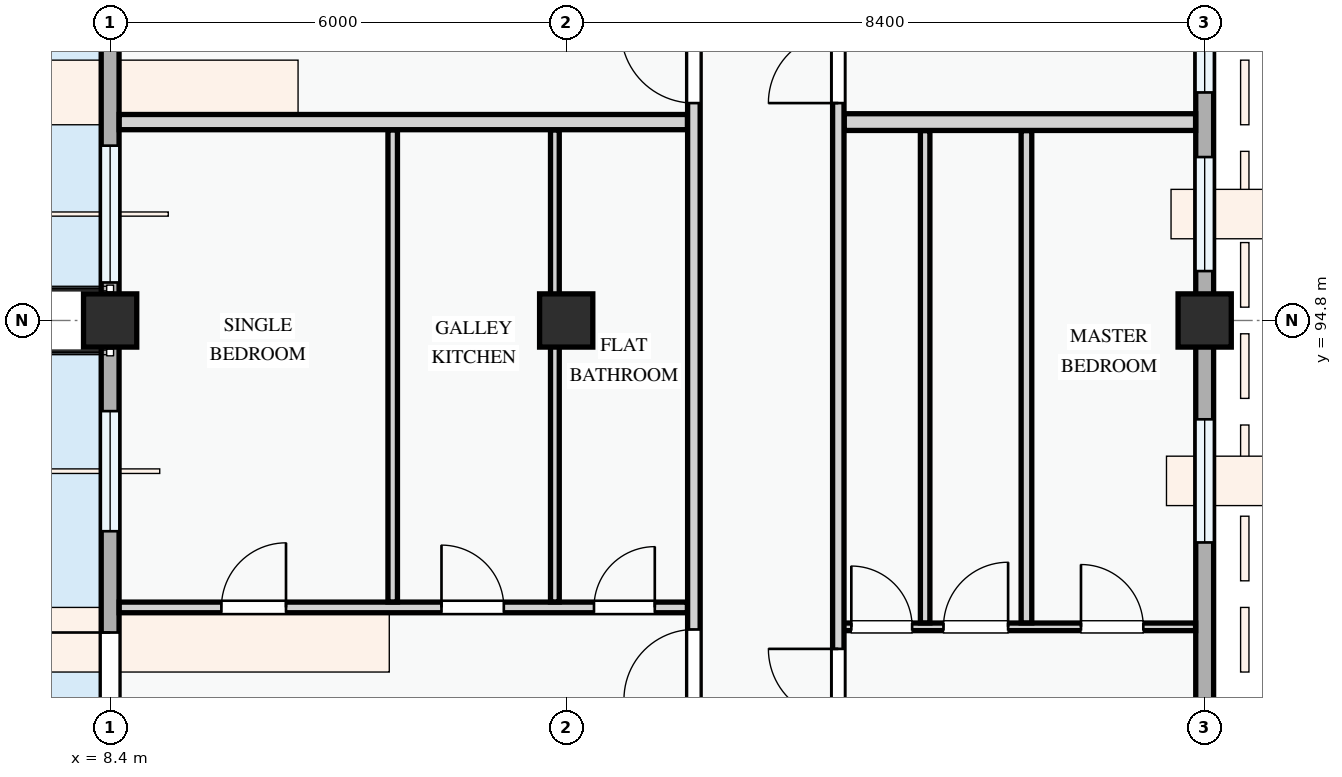
"""IFC4 building model, lengths in metres.
Left out: names, types, materials, properties, quantities, classifications, styles, units other than length and angle.
Written with IfcOpenShell. Run it as: python <this file> out.ifc"""

import sys

from ifc_helpers import new_model, si_unit, direction, frame, frame_2d, origin, origin_2d, place, context, subcontext, project, spatial, rectangle, extrude, element, fill, save


model = new_model("IFC4")
c1 = context("Model", 3, precision=1e-05, world=origin(), true_north=direction((0.0, 1.0)))
c2 = subcontext(c1, "Body", "Model", "MODEL_VIEW")
j1 = project(units=[si_unit("LENGTHUNIT", "METRE"), si_unit("PLANEANGLEUNIT", "RADIAN")], contexts=[c1])
p1 = place(None, origin())
s1 = spatial("IfcSite", under=j1, at=p1, CompositionType="ELEMENT")
p2 = place(p1, origin())
s2 = spatial("IfcBuilding", under=s1, at=p2, CompositionType="ELEMENT")
p3 = place(p2, frame((0.0, 0.0, 11.4)))
s3 = spatial("IfcBuildingStorey", under=s2, at=p3, CompositionType="ELEMENT", Elevation=11.4)
for number, where, z_axis, x_axis in (
    (1, (8.4, 94.8, 0.0), (0.0, 0.0, 1.0), (1.0, 0.0, 0.0)),
    (2, (14.4, 94.8, 0.0), (0.0, 0.0, 1.0), (1.0, 0.0, 0.0)),
    (3, (22.8, 94.8, 0.0), (0.0, 0.0, 1.0), (1.0, 0.0, 0.0)),
):
    element("IfcColumn", number, at=place(p3, frame(where, z_axis=z_axis, x_axis=x_axis)), inside=s3, PredefinedType="COLUMN", context=c2, shape_type="SweptSolid", body=[
        extrude(rectangle(XDim=0.7, YDim=0.7, at=origin_2d()), origin(), (0.0, 0.0, 1.0), 3.3),
    ])
p4 = place(p3, frame((8.4, 100.8, 0.0), z_axis=(0.0, 0.0, 1.0), x_axis=(0.0, -1.0, 0.0)))
e4 = element("IfcWall", 4, at=p4, inside=s3, PredefinedType="STANDARD", context=c2, shape_type="SweptSolid", body=[
    extrude(rectangle(XDim=6.0, YDim=0.235, at=frame_2d((3.0, 0.0))), origin(), (0.0, 0.0, 1.0), 2.575),
])
p5 = place(p4, frame((1.24, 0.0, 0.0)))
e5 = element("IfcOpeningElement", 5, at=p5, cuts=e4, PredefinedType="OPENING", context=c2, shape_type="SweptSolid", body=[
    extrude(rectangle(XDim=1.2, YDim=2.15, at=frame_2d((0.6, 1.075))), frame((0.0, 0.127, 0.0), z_axis=(0.0, -1.0, 0.0), x_axis=(1.0, 0.0, 0.0)), (0.0, 0.0, 1.0), 0.255),
])
p6 = place(p4, frame((3.7, 0.0, 0.78)))
e6 = element("IfcOpeningElement", 6, at=p6, cuts=e4, PredefinedType="OPENING", context=c2, shape_type="SweptSolid", body=[
    extrude(rectangle(XDim=1.8, YDim=1.5, at=frame_2d((0.9, 0.75))), frame((0.0, 0.127, 0.0), z_axis=(0.0, -1.0, 0.0), x_axis=(1.0, 0.0, 0.0)), (0.0, 0.0, 1.0), 0.255),
])
p7 = place(p3, frame((8.4, 94.8, 0.0), z_axis=(0.0, 0.0, 1.0), x_axis=(0.0, -1.0, 0.0)))
e7 = element("IfcWall", 7, at=p7, inside=s3, PredefinedType="STANDARD", context=c2, shape_type="SweptSolid", body=[
    extrude(rectangle(XDim=8.4, YDim=0.235, at=frame_2d((4.2, 0.0))), origin(), (0.0, 0.0, 1.0), 2.425),
])
p8 = place(p7, frame((4.105, 0.0, 0.0)))
e8 = element("IfcOpeningElement", 8, at=p8, cuts=e7, PredefinedType="OPENING", context=c2, shape_type="SweptSolid", body=[
    extrude(rectangle(XDim=1.25, YDim=2.2, at=frame_2d((0.625, 1.1))), frame((0.0, 0.127, 0.0), z_axis=(0.0, -1.0, 0.0), x_axis=(1.0, 0.0, 0.0)), (0.0, 0.0, 1.0), 0.255),
])
p9 = place(p7, frame((1.192, 0.0, 0.78)))
e9 = element("IfcOpeningElement", 9, at=p9, cuts=e7, PredefinedType="OPENING", context=c2, shape_type="SweptSolid", body=[
    extrude(rectangle(XDim=1.58, YDim=1.48, at=frame_2d((0.79, 0.74))), frame((0.0, 0.127, 0.0), z_axis=(0.0, -1.0, 0.0), x_axis=(1.0, 0.0, 0.0)), (0.0, 0.0, 1.0), 0.255),
])
p10 = place(p7, frame((5.768, 0.0, 0.78)))
e10 = element("IfcOpeningElement", 10, at=p10, cuts=e7, PredefinedType="OPENING", context=c2, shape_type="SweptSolid", body=[
    extrude(rectangle(XDim=2.08, YDim=1.52, at=frame_2d((1.04, 0.76))), frame((0.0, 0.127, 0.0), z_axis=(0.0, -1.0, 0.0), x_axis=(1.0, 0.0, 0.0)), (0.0, 0.0, 1.0), 0.255),
])
p11 = place(p3, frame((22.8, 86.4, 0.0), z_axis=(0.0, 0.0, 1.0), x_axis=(0.0, 1.0, 0.0)))
e11 = element("IfcWall", 11, at=p11, inside=s3, PredefinedType="STANDARD", context=c2, shape_type="SweptSolid", body=[
    extrude(rectangle(XDim=8.4, YDim=0.235, at=frame_2d((4.2, 0.0))), origin(), (0.0, 0.0, 1.0), 2.425),
])
p12 = place(p11, frame((1.59, 0.0, 0.78)))
e12 = element("IfcOpeningElement", 12, at=p12, cuts=e11, PredefinedType="OPENING", context=c2, shape_type="SweptSolid", body=[
    extrude(rectangle(XDim=1.38, YDim=1.48, at=frame_2d((0.69, 0.74))), frame((0.0, 0.127, 0.0), z_axis=(0.0, -1.0, 0.0), x_axis=(1.0, 0.0, 0.0)), (0.0, 0.0, 1.0), 0.255),
])
p13 = place(p11, frame((5.48, 0.0, 0.78)))
e13 = element("IfcOpeningElement", 13, at=p13, cuts=e11, PredefinedType="OPENING", context=c2, shape_type="SweptSolid", body=[
    extrude(rectangle(XDim=1.62, YDim=1.38, at=frame_2d((0.81, 0.69))), frame((0.0, 0.127, 0.0), z_axis=(0.0, -1.0, 0.0), x_axis=(1.0, 0.0, 0.0)), (0.0, 0.0, 1.0), 0.255),
])
p14 = place(p3, frame((22.8, 94.8, 0.0), z_axis=(0.0, 0.0, 1.0), x_axis=(0.0, 1.0, 0.0)))
e14 = element("IfcWall", 14, at=p14, inside=s3, PredefinedType="STANDARD", context=c2, shape_type="SweptSolid", body=[
    extrude(rectangle(XDim=6.0, YDim=0.235, at=frame_2d((3.0, 0.0))), origin(), (0.0, 0.0, 1.0), 2.575),
])
p15 = place(p14, frame((0.65, 0.0, 0.78)))
e15 = element("IfcOpeningElement", 15, at=p15, cuts=e14, PredefinedType="OPENING", context=c2, shape_type="SweptSolid", body=[
    extrude(rectangle(XDim=1.5, YDim=1.5, at=frame_2d((0.75, 0.75))), frame((0.0, 0.127, 0.0), z_axis=(0.0, -1.0, 0.0), x_axis=(1.0, 0.0, 0.0)), (0.0, 0.0, 1.0), 0.255),
])
p16 = place(p14, frame((3.0, 0.0, 0.78)))
e16 = element("IfcOpeningElement", 16, at=p16, cuts=e14, PredefinedType="OPENING", context=c2, shape_type="SweptSolid", body=[
    extrude(rectangle(XDim=2.42, YDim=1.52, at=frame_2d((1.21, 0.76))), frame((0.0, 0.127, 0.0), z_axis=(0.0, -1.0, 0.0), x_axis=(1.0, 0.0, 0.0)), (0.0, 0.0, 1.0), 0.255),
])
p17 = place(p3, frame((8.52, 91.025, 0.0), z_axis=(0.0, 0.0, 1.0), x_axis=(1.0, 0.0, 0.0)))
e17 = element("IfcWall", 17, at=p17, inside=s3, PredefinedType="PARTITIONING", context=c2, shape_type="SweptSolid", body=[
    extrude(rectangle(XDim=7.476, YDim=0.14, at=frame_2d((3.738, 0.0))), origin(), (0.0, 0.0, 1.0), 3.0),
])
p18 = place(p17, frame((1.344, 0.0, 0.0)))
e18 = element("IfcOpeningElement", 18, at=p18, cuts=e17, PredefinedType="OPENING", context=c2, shape_type="SweptSolid", body=[
    extrude(rectangle(XDim=0.85, YDim=2.1, at=frame_2d((0.425, 1.05))), frame((0.0, 0.08, 0.0), z_axis=(0.0, -1.0, 0.0), x_axis=(1.0, 0.0, 0.0)), (0.0, 0.0, 1.0), 0.16),
])
p19 = place(p17, frame((4.24, 0.0, 0.0)))
e19 = element("IfcOpeningElement", 19, at=p19, cuts=e17, PredefinedType="OPENING", context=c2, shape_type="SweptSolid", body=[
    extrude(rectangle(XDim=0.82, YDim=2.08, at=frame_2d((0.41, 1.04))), frame((0.0, 0.08, 0.0), z_axis=(0.0, -1.0, 0.0), x_axis=(1.0, 0.0, 0.0)), (0.0, 0.0, 1.0), 0.16),
])
p20 = place(p17, frame((6.246, 0.0, 0.0)))
e20 = element("IfcOpeningElement", 20, at=p20, cuts=e17, PredefinedType="OPENING", context=c2, shape_type="SweptSolid", body=[
    extrude(rectangle(XDim=0.8, YDim=2.1, at=frame_2d((0.4, 1.05))), frame((0.0, 0.08, 0.0), z_axis=(0.0, -1.0, 0.0), x_axis=(1.0, 0.0, 0.0)), (0.0, 0.0, 1.0), 0.16),
])
p21 = place(p3, frame((12.118, 91.097, 0.0), z_axis=(0.0, 0.0, 1.0), x_axis=(0.0, 1.0, 0.0)))
e21 = element("IfcWall", 21, at=p21, inside=s3, PredefinedType="PARTITIONING", context=c2, shape_type="SweptSolid", body=[
    extrude(rectangle(XDim=6.211, YDim=0.125, at=frame_2d((3.105, 0.0))), origin(), (0.0, 0.0, 1.0), 3.0),
])
p22 = place(p3, frame((14.251, 91.097, 0.0), z_axis=(0.0, 0.0, 1.0), x_axis=(0.0, 1.0, 0.0)))
e22 = element("IfcWall", 22, at=p22, inside=s3, PredefinedType="PARTITIONING", context=c2, shape_type="SweptSolid", body=[
    extrude(rectangle(XDim=6.211, YDim=0.115, at=frame_2d((3.105, 0.0))), origin(), (0.0, 0.0, 1.0), 2.425),
])
p23 = place(p3, frame((17.98, 90.77, 0.0), z_axis=(0.0, 0.0, 1.0), x_axis=(1.0, 0.0, 0.0)))
e23 = element("IfcWall", 23, at=p23, inside=s3, PredefinedType="PARTITIONING", context=c2, shape_type="SweptSolid", body=[
    extrude(rectangle(XDim=4.7, YDim=0.1, at=frame_2d((2.35, 0.0))), origin(), (0.0, 0.0, 1.0), 3.0),
])
p24 = place(p23, frame((0.171, 0.0, 0.0)))
e24 = element("IfcOpeningElement", 24, at=p24, cuts=e23, PredefinedType="OPENING", context=c2, shape_type="SweptSolid", body=[
    extrude(rectangle(XDim=0.8, YDim=2.1, at=frame_2d((0.4, 1.05))), frame((0.0, 0.06, 0.0), z_axis=(0.0, -1.0, 0.0), x_axis=(1.0, 0.0, 0.0)), (0.0, 0.0, 1.0), 0.12),
])
p25 = place(p23, frame((1.384, 0.0, 0.0)))
e25 = element("IfcOpeningElement", 25, at=p25, cuts=e23, PredefinedType="OPENING", context=c2, shape_type="SweptSolid", body=[
    extrude(rectangle(XDim=0.85, YDim=2.1, at=frame_2d((0.425, 1.05))), frame((0.0, 0.06, 0.0), z_axis=(0.0, -1.0, 0.0), x_axis=(1.0, 0.0, 0.0)), (0.0, 0.0, 1.0), 0.12),
])
p26 = place(p23, frame((3.193, 0.0, 0.0)))
e26 = element("IfcOpeningElement", 26, at=p26, cuts=e23, PredefinedType="OPENING", context=c2, shape_type="SweptSolid", body=[
    extrude(rectangle(XDim=0.82, YDim=2.08, at=frame_2d((0.41, 1.04))), frame((0.0, 0.06, 0.0), z_axis=(0.0, -1.0, 0.0), x_axis=(1.0, 0.0, 0.0)), (0.0, 0.0, 1.0), 0.12),
])
p27 = place(p3, frame((20.455, 90.822, 0.0), z_axis=(0.0, 0.0, 1.0), x_axis=(0.0, 1.0, 0.0)))
e27 = element("IfcWall", 27, at=p27, inside=s3, PredefinedType="PARTITIONING", context=c2, shape_type="SweptSolid", body=[
    extrude(rectangle(XDim=6.477, YDim=0.14, at=frame_2d((3.238, 0.0))), origin(), (0.0, 0.0, 1.0), 3.0),
])
p28 = place(p3, frame((19.122, 90.822, 0.0), z_axis=(0.0, 0.0, 1.0), x_axis=(0.0, 1.0, 0.0)))
e28 = element("IfcWall", 28, at=p28, inside=s3, PredefinedType="PARTITIONING", context=c2, shape_type="SweptSolid", body=[
    extrude(rectangle(XDim=6.477, YDim=0.125, at=frame_2d((3.238, 0.0))), origin(), (0.0, 0.0, 1.0), 3.0),
])
p29 = place(p3, frame((8.52, 97.41, 0.0), z_axis=(0.0, 0.0, 1.0), x_axis=(1.0, 0.0, 0.0)))
e29 = element("IfcWall", 29, at=p29, inside=s3, PredefinedType="PARTITIONING", context=c2, shape_type="SweptSolid", body=[
    extrude(rectangle(XDim=7.476, YDim=0.2, at=frame_2d((3.738, 0.0))), origin(), (0.0, 0.0, 1.0), 3.0),
])
p30 = place(p3, frame((18.057, 97.41, 0.0), z_axis=(0.0, 0.0, 1.0), x_axis=(1.0, 0.0, 0.0)))
e30 = element("IfcWall", 30, at=p30, inside=s3, PredefinedType="PARTITIONING", context=c2, shape_type="SweptSolid", body=[
    extrude(rectangle(XDim=4.624, YDim=0.22, at=frame_2d((2.312, 0.0))), origin(), (0.0, 0.0, 1.0), 3.0),
])
p31 = place(p3, frame((16.08, 72.06, 0.0), z_axis=(0.0, 0.0, 1.0), x_axis=(0.0, 1.0, 0.0)))
e31 = element("IfcWall", 31, at=p31, inside=s3, PredefinedType="PARTITIONING", context=c2, shape_type="SweptSolid", body=[
    extrude(rectangle(XDim=37.28, YDim=0.165, at=frame_2d((18.64, 0.0))), origin(), (0.0, 0.0, 1.0), 3.0),
])
p32 = place(p31, frame((3.722, 0.0, 0.0)))
e32 = element("IfcOpeningElement", 32, at=p32, cuts=e31, PredefinedType="OPENING", context=c2, shape_type="SweptSolid", body=[
    extrude(rectangle(XDim=0.92, YDim=2.1, at=frame_2d((0.46, 1.05))), frame((0.0, 0.093, 0.0), z_axis=(0.0, -1.0, 0.0), x_axis=(1.0, 0.0, 0.0)), (0.0, 0.0, 1.0), 0.185),
])
p33 = place(p31, frame((17.755, 0.0, 0.0)))
e33 = element("IfcOpeningElement", 33, at=p33, cuts=e31, PredefinedType="OPENING", context=c2, shape_type="SweptSolid", body=[
    extrude(rectangle(XDim=0.92, YDim=2.1, at=frame_2d((0.46, 1.05))), frame((0.0, 0.093, 0.0), z_axis=(0.0, -1.0, 0.0), x_axis=(1.0, 0.0, 0.0)), (0.0, 0.0, 1.0), 0.185),
])
p34 = place(p31, frame((25.6, 0.0, 0.0)))
e34 = element("IfcOpeningElement", 34, at=p34, cuts=e31, PredefinedType="OPENING", context=c2, shape_type="SweptSolid", body=[
    extrude(rectangle(XDim=0.96, YDim=2.12, at=frame_2d((0.48, 1.06))), frame((0.0, 0.093, 0.0), z_axis=(0.0, -1.0, 0.0), x_axis=(1.0, 0.0, 0.0)), (0.0, 0.0, 1.0), 0.185),
])
p35 = place(p3, frame((17.98, 72.06, 0.0), z_axis=(0.0, 0.0, 1.0), x_axis=(0.0, 1.0, 0.0)))
e35 = element("IfcWall", 35, at=p35, inside=s3, PredefinedType="PARTITIONING", context=c2, shape_type="SweptSolid", body=[
    extrude(rectangle(XDim=37.28, YDim=0.15, at=frame_2d((18.64, 0.0))), origin(), (0.0, 0.0, 1.0), 3.0),
])
p36 = place(p35, frame((3.684, 0.0, 0.0)))
e36 = element("IfcOpeningElement", 36, at=p36, cuts=e35, PredefinedType="OPENING", context=c2, shape_type="SweptSolid", body=[
    extrude(rectangle(XDim=0.92, YDim=2.1, at=frame_2d((0.46, 1.05))), frame((0.0, 0.085, 0.0), z_axis=(0.0, -1.0, 0.0), x_axis=(1.0, 0.0, 0.0)), (0.0, 0.0, 1.0), 0.17),
])
p37 = place(p35, frame((17.5, 0.0, 0.0)))
e37 = element("IfcOpeningElement", 37, at=p37, cuts=e35, PredefinedType="OPENING", context=c2, shape_type="SweptSolid", body=[
    extrude(rectangle(XDim=0.92, YDim=2.1, at=frame_2d((0.46, 1.05))), frame((0.0, 0.085, 0.0), z_axis=(0.0, -1.0, 0.0), x_axis=(1.0, 0.0, 0.0)), (0.0, 0.0, 1.0), 0.17),
])
p38 = place(p35, frame((25.6, 0.0, 0.0)))
e38 = element("IfcOpeningElement", 38, at=p38, cuts=e35, PredefinedType="OPENING", context=c2, shape_type="SweptSolid", body=[
    extrude(rectangle(XDim=0.92, YDim=2.1, at=frame_2d((0.46, 1.05))), frame((0.0, 0.085, 0.0), z_axis=(0.0, -1.0, 0.0), x_axis=(1.0, 0.0, 0.0)), (0.0, 0.0, 1.0), 0.17),
])
p39 = place(p6, origin())
e39 = element("IfcWindow", 39, at=p39, inside=s3, PartitioningType="DOUBLE_PANEL_VERTICAL", PredefinedType="WINDOW", context=c2, shape_type="SweptSolid", body=[
    extrude(rectangle(XDim=1.8, YDim=1.5, at=frame_2d((0.9, 0.75))), frame((0.0, 0.03, 0.0), z_axis=(0.0, -1.0, 0.0), x_axis=(1.0, 0.0, 0.0)), (0.0, 0.0, 1.0), 0.06),
])
fill(e6, e39)
p40 = place(p8, frame((1.25, 0.0, 0.0), z_axis=(0.0, 0.0, 1.0), x_axis=(-1.0, 0.0, 0.0)))
e40 = element("IfcDoor", 40, at=p40, inside=s3, OperationType="SINGLE_SWING_RIGHT", PredefinedType="DOOR", context=c2, shape_type="SweptSolid", body=[
    extrude(rectangle(XDim=1.25, YDim=2.2, at=frame_2d((0.625, 1.1))), frame((0.0, 0.025, 0.0), z_axis=(0.0, -1.0, 0.0), x_axis=(1.0, 0.0, 0.0)), (0.0, 0.0, 1.0), 0.05),
])
fill(e8, e40)
p41 = place(p9, origin())
e41 = element("IfcWindow", 41, at=p41, inside=s3, PartitioningType="SINGLE_PANEL", PredefinedType="WINDOW", context=c2, shape_type="SweptSolid", body=[
    extrude(rectangle(XDim=1.58, YDim=1.48, at=frame_2d((0.79, 0.74))), frame((0.0, 0.03, 0.0), z_axis=(0.0, -1.0, 0.0), x_axis=(1.0, 0.0, 0.0)), (0.0, 0.0, 1.0), 0.06),
])
fill(e9, e41)
p42 = place(p13, origin())
e42 = element("IfcWindow", 42, at=p42, inside=s3, PartitioningType="DOUBLE_PANEL_VERTICAL", PredefinedType="WINDOW", context=c2, shape_type="SweptSolid", body=[
    extrude(rectangle(XDim=1.62, YDim=1.38, at=frame_2d((0.81, 0.69))), frame((0.0, 0.03, 0.0), z_axis=(0.0, -1.0, 0.0), x_axis=(1.0, 0.0, 0.0)), (0.0, 0.0, 1.0), 0.06),
])
fill(e13, e42)
p43 = place(p15, origin())
e43 = element("IfcWindow", 43, at=p43, inside=s3, PartitioningType="SINGLE_PANEL", PredefinedType="WINDOW", context=c2, shape_type="SweptSolid", body=[
    extrude(rectangle(XDim=1.5, YDim=1.5, at=frame_2d((0.75, 0.75))), frame((0.0, 0.03, 0.0), z_axis=(0.0, -1.0, 0.0), x_axis=(1.0, 0.0, 0.0)), (0.0, 0.0, 1.0), 0.06),
])
fill(e15, e43)
p44 = place(p16, origin())
e44 = element("IfcWindow", 44, at=p44, inside=s3, PartitioningType="DOUBLE_PANEL_VERTICAL", PredefinedType="WINDOW", context=c2, shape_type="SweptSolid", body=[
    extrude(rectangle(XDim=2.42, YDim=1.52, at=frame_2d((1.21, 0.76))), frame((0.0, 0.03, 0.0), z_axis=(0.0, -1.0, 0.0), x_axis=(1.0, 0.0, 0.0)), (0.0, 0.0, 1.0), 0.06),
])
fill(e16, e44)
p45 = place(p18, origin())
e45 = element("IfcDoor", 45, at=p45, inside=s3, OperationType="SINGLE_SWING_RIGHT", PredefinedType="DOOR", context=c2, shape_type="SweptSolid", body=[
    extrude(rectangle(XDim=0.85, YDim=2.1, at=frame_2d((0.425, 1.05))), frame((0.0, 0.025, 0.0), z_axis=(0.0, -1.0, 0.0), x_axis=(1.0, 0.0, 0.0)), (0.0, 0.0, 1.0), 0.05),
])
fill(e18, e45)
p46 = place(p19, origin())
e46 = element("IfcDoor", 46, at=p46, inside=s3, OperationType="SINGLE_SWING_LEFT", PredefinedType="DOOR", context=c2, shape_type="SweptSolid", body=[
    extrude(rectangle(XDim=0.82, YDim=2.08, at=frame_2d((0.41, 1.04))), frame((0.0, 0.025, 0.0), z_axis=(0.0, -1.0, 0.0), x_axis=(1.0, 0.0, 0.0)), (0.0, 0.0, 1.0), 0.05),
])
fill(e19, e46)
p47 = place(p20, origin())
e47 = element("IfcDoor", 47, at=p47, inside=s3, OperationType="SINGLE_SWING_RIGHT", PredefinedType="DOOR", context=c2, shape_type="SweptSolid", body=[
    extrude(rectangle(XDim=0.8, YDim=2.1, at=frame_2d((0.4, 1.05))), frame((0.0, 0.025, 0.0), z_axis=(0.0, -1.0, 0.0), x_axis=(1.0, 0.0, 0.0)), (0.0, 0.0, 1.0), 0.05),
])
fill(e20, e47)
p48 = place(p24, origin())
e48 = element("IfcDoor", 48, at=p48, inside=s3, OperationType="SINGLE_SWING_LEFT", PredefinedType="DOOR", context=c2, shape_type="SweptSolid", body=[
    extrude(rectangle(XDim=0.8, YDim=2.1, at=frame_2d((0.4, 1.05))), frame((0.0, 0.025, 0.0), z_axis=(0.0, -1.0, 0.0), x_axis=(1.0, 0.0, 0.0)), (0.0, 0.0, 1.0), 0.05),
])
fill(e24, e48)
p49 = place(p25, origin())
e49 = element("IfcDoor", 49, at=p49, inside=s3, OperationType="SINGLE_SWING_RIGHT", PredefinedType="DOOR", context=c2, shape_type="SweptSolid", body=[
    extrude(rectangle(XDim=0.85, YDim=2.1, at=frame_2d((0.425, 1.05))), frame((0.0, 0.025, 0.0), z_axis=(0.0, -1.0, 0.0), x_axis=(1.0, 0.0, 0.0)), (0.0, 0.0, 1.0), 0.05),
])
fill(e25, e49)
p50 = place(p26, origin())
e50 = element("IfcDoor", 50, at=p50, inside=s3, OperationType="SINGLE_SWING_LEFT", PredefinedType="DOOR", context=c2, shape_type="SweptSolid", body=[
    extrude(rectangle(XDim=0.82, YDim=2.08, at=frame_2d((0.41, 1.04))), frame((0.0, 0.025, 0.0), z_axis=(0.0, -1.0, 0.0), x_axis=(1.0, 0.0, 0.0)), (0.0, 0.0, 1.0), 0.05),
])
fill(e26, e50)
p51 = place(p33, origin())
e51 = element("IfcDoor", 51, at=p51, inside=s3, OperationType="SINGLE_SWING_LEFT", PredefinedType="DOOR", context=c2, shape_type="SweptSolid", body=[
    extrude(rectangle(XDim=0.92, YDim=2.1, at=frame_2d((0.46, 1.05))), frame((0.0, 0.025, 0.0), z_axis=(0.0, -1.0, 0.0), x_axis=(1.0, 0.0, 0.0)), (0.0, 0.0, 1.0), 0.05),
])
fill(e33, e51)
p52 = place(p34, origin())
e52 = element("IfcDoor", 52, at=p52, inside=s3, OperationType="SINGLE_SWING_RIGHT", PredefinedType="DOOR", context=c2, shape_type="SweptSolid", body=[
    extrude(rectangle(XDim=0.96, YDim=2.12, at=frame_2d((0.48, 1.06))), frame((0.0, 0.025, 0.0), z_axis=(0.0, -1.0, 0.0), x_axis=(1.0, 0.0, 0.0)), (0.0, 0.0, 1.0), 0.05),
])
fill(e34, e52)
p53 = place(p37, origin())
e53 = element("IfcDoor", 53, at=p53, inside=s3, OperationType="SINGLE_SWING_RIGHT", PredefinedType="DOOR", context=c2, shape_type="SweptSolid", body=[
    extrude(rectangle(XDim=0.92, YDim=2.1, at=frame_2d((0.46, 1.05))), frame((0.0, 0.025, 0.0), z_axis=(0.0, -1.0, 0.0), x_axis=(1.0, 0.0, 0.0)), (0.0, 0.0, 1.0), 0.05),
])
fill(e37, e53)
p54 = place(p38, origin())
e54 = element("IfcDoor", 54, at=p54, inside=s3, OperationType="SINGLE_SWING_LEFT", PredefinedType="DOOR", context=c2, shape_type="SweptSolid", body=[
    extrude(rectangle(XDim=0.92, YDim=2.1, at=frame_2d((0.46, 1.05))), frame((0.0, 0.025, 0.0), z_axis=(0.0, -1.0, 0.0), x_axis=(1.0, 0.0, 0.0)), (0.0, 0.0, 1.0), 0.05),
])
fill(e38, e54)
save(model, sys.argv[1])
